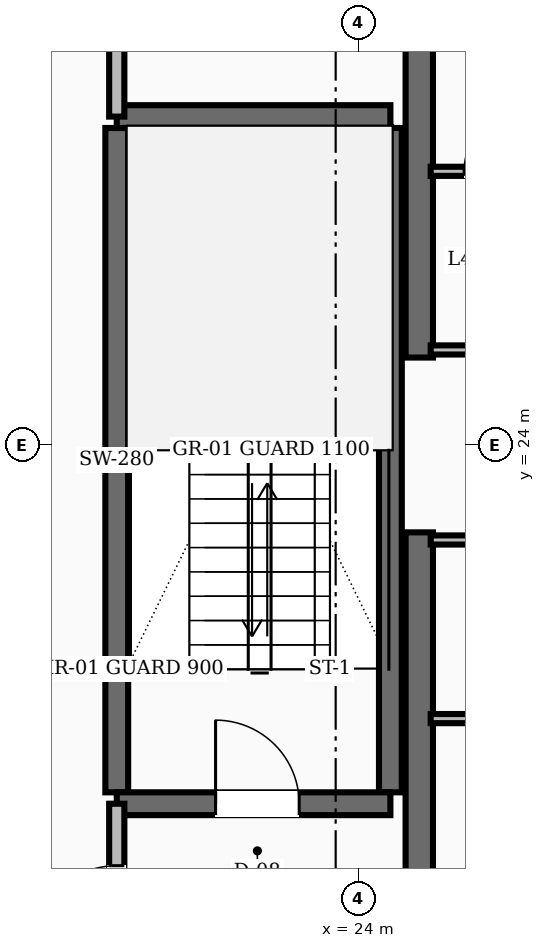
"""IFC4 building model, lengths in metres.
Left out: names, types, materials, properties, quantities, classifications, styles, units other than length and angle.
Written with IfcOpenShell. Run it as: python <this file> out.ifc"""

import sys

from ifc_helpers import new_model, si_unit, direction, frame, frame_2d, origin, place, context, subcontext, project, spatial, rectangle, extrude, element, fill, save


model = new_model("IFC4")
c1 = context("Model", 3, precision=1e-05, world=origin(), true_north=direction((0.0, 1.0)))
c2 = subcontext(c1, "Body", "Model", "MODEL_VIEW")
j1 = project(units=[si_unit("LENGTHUNIT", "METRE"), si_unit("PLANEANGLEUNIT", "RADIAN")], contexts=[c1])
p1 = place(None, origin())
s1 = spatial("IfcSite", under=j1, at=p1, CompositionType="ELEMENT")
p2 = place(p1, origin())
s2 = spatial("IfcBuilding", under=s1, at=p2, CompositionType="ELEMENT")
p3 = place(p2, frame((0.0, 0.0, 156.8)))
s3 = spatial("IfcBuildingStorey", under=s2, at=p3, CompositionType="ELEMENT", Elevation=156.8)
for number, where, z_axis, x_axis in (
    (1, (24.8, 16.55, 0.0), (0.0, 0.0, 1.0), (0.0, 1.0, 0.0)),
    (2, (24.8, 25.15, 0.0), (0.0, 0.0, 1.0), (0.0, 1.0, 0.0)),
):
    element("IfcWall", number, at=place(p3, frame(where, z_axis=z_axis, x_axis=x_axis)), inside=s3, PredefinedType="SHEAR", context=c2, shape_type="SweptSolid", body=[
        extrude(rectangle(XDim=6.3, YDim=0.36, at=frame_2d((3.15, 0.0))), origin(), (0.0, 0.0, 1.0), 3.6),
    ])
for number, where, z_axis, x_axis in (
    (3, (20.82, 19.43, 0.0), (0.0, 0.0, 1.0), (0.0, 1.0, 0.0)),
    (4, (24.42, 19.43, 0.0), (0.0, 0.0, 1.0), (0.0, 1.0, 0.0)),
):
    element("IfcWall", number, at=place(p3, frame(where, z_axis=z_axis, x_axis=x_axis)), inside=s3, PredefinedType="SHEAR", context=c2, shape_type="SweptSolid", body=[
        extrude(rectangle(XDim=8.74, YDim=0.3, at=frame_2d((4.37, 0.0))), origin(), (0.0, 0.0, 1.0), 3.6),
    ])
p4 = place(p3, frame((20.82, 19.28, 0.0), z_axis=(0.0, 0.0, 1.0), x_axis=(1.0, 0.0, 0.0)))
e5 = element("IfcWall", 5, at=p4, inside=s3, PredefinedType="SHEAR", context=c2, shape_type="SweptSolid", body=[
    extrude(rectangle(XDim=3.6, YDim=0.3, at=frame_2d((1.8, 0.0))), origin(), (0.0, 0.0, 1.0), 3.6),
])
p5 = place(p4, frame((1.3, 0.0, 0.0)))
e6 = element("IfcOpeningElement", 6, at=p5, cuts=e5, PredefinedType="OPENING", context=c2, shape_type="SweptSolid", body=[
    extrude(rectangle(XDim=1.1, YDim=2.1, at=frame_2d((0.55, 1.05))), frame((0.0, 0.16, 0.0), z_axis=(0.0, -1.0, 0.0), x_axis=(1.0, 0.0, 0.0)), (0.0, 0.0, 1.0), 0.32),
])
p6 = place(p3, frame((20.82, 28.32, 0.0), z_axis=(0.0, 0.0, 1.0), x_axis=(1.0, 0.0, 0.0)))
e7 = element("IfcWall", 7, at=p6, inside=s3, PredefinedType="SHEAR", context=c2, shape_type="SweptSolid", body=[
    extrude(rectangle(XDim=3.6, YDim=0.3, at=frame_2d((1.8, 0.0))), origin(), (0.0, 0.0, 1.0), 3.6),
])
p7 = place(p3, frame((20.82, 16.55, 0.0), z_axis=(0.0, 0.0, 1.0), x_axis=(0.0, 1.0, 0.0)))
e8 = element("IfcWall", 8, at=p7, inside=s3, PredefinedType="SOLIDWALL", context=c2, shape_type="SweptSolid", body=[
    extrude(rectangle(XDim=2.73, YDim=0.2, at=frame_2d((1.365, 0.0))), origin(), (0.0, 0.0, 1.0), 2.8),
])
p8 = place(p7, frame((0.815, 0.0, 0.0)))
e9 = element("IfcOpeningElement", 9, at=p8, cuts=e8, PredefinedType="OPENING", context=c2, shape_type="SweptSolid", body=[
    extrude(rectangle(XDim=1.1, YDim=2.1, at=frame_2d((0.55, 1.05))), frame((0.0, 0.11, 0.0), z_axis=(0.0, -1.0, 0.0), x_axis=(1.0, 0.0, 0.0)), (0.0, 0.0, 1.0), 0.22),
])
p9 = place(p3, frame((20.82, 28.32, 0.0), z_axis=(0.0, 0.0, 1.0), x_axis=(0.0, 1.0, 0.0)))
e10 = element("IfcWall", 10, at=p9, inside=s3, PredefinedType="SOLIDWALL", context=c2, shape_type="SweptSolid", body=[
    extrude(rectangle(XDim=3.13, YDim=0.2, at=frame_2d((1.565, 0.0))), origin(), (0.0, 0.0, 1.0), 2.8),
])
p10 = place(p9, frame((1.09, 0.0, 0.0)))
e11 = element("IfcOpeningElement", 11, at=p10, cuts=e10, PredefinedType="OPENING", context=c2, shape_type="SweptSolid", body=[
    extrude(rectangle(XDim=0.95, YDim=2.1, at=frame_2d((0.475, 1.05))), frame((0.0, 0.11, 0.0), z_axis=(0.0, -1.0, 0.0), x_axis=(1.0, 0.0, 0.0)), (0.0, 0.0, 1.0), 0.22),
])
p11 = place(p3, frame((24.95, 25.25, 0.0), z_axis=(0.0, 0.0, 1.0), x_axis=(1.0, 0.0, 0.0)))
e12 = element("IfcWall", 12, at=p11, inside=s3, PredefinedType="PARTITIONING", context=c2, shape_type="SweptSolid", body=[
    extrude(rectangle(XDim=3.2, YDim=0.12, at=frame_2d((1.6, 0.0))), origin(), (0.0, 0.0, 1.0), 2.8),
])
p12 = place(p11, frame((1.125, 0.0, 0.0)))
e13 = element("IfcOpeningElement", 13, at=p12, cuts=e12, PredefinedType="OPENING", context=c2, shape_type="SweptSolid", body=[
    extrude(rectangle(XDim=0.95, YDim=2.1, at=frame_2d((0.475, 1.05))), frame((0.0, 0.07, 0.0), z_axis=(0.0, -1.0, 0.0), x_axis=(1.0, 0.0, 0.0)), (0.0, 0.0, 1.0), 0.14),
])
p13 = place(p3, frame((24.95, 22.75, 0.0), z_axis=(0.0, 0.0, 1.0), x_axis=(1.0, 0.0, 0.0)))
e14 = element("IfcWall", 14, at=p13, inside=s3, PredefinedType="PARTITIONING", context=c2, shape_type="SweptSolid", body=[
    extrude(rectangle(XDim=3.2, YDim=0.12, at=frame_2d((1.6, 0.0))), origin(), (0.0, 0.0, 1.0), 2.8),
])
p14 = place(p13, frame((1.125, 0.0, 0.0)))
e15 = element("IfcOpeningElement", 15, at=p14, cuts=e14, PredefinedType="OPENING", context=c2, shape_type="SweptSolid", body=[
    extrude(rectangle(XDim=0.95, YDim=2.1, at=frame_2d((0.475, 1.05))), frame((0.0, 0.07, 0.0), z_axis=(0.0, -1.0, 0.0), x_axis=(1.0, 0.0, 0.0)), (0.0, 0.0, 1.0), 0.14),
])
p15 = place(p3, frame((24.95, 27.6, 0.0), z_axis=(0.0, 0.0, 1.0), x_axis=(1.0, 0.0, 0.0)))
e16 = element("IfcWall", 16, at=p15, inside=s3, PredefinedType="PARTITIONING", context=c2, shape_type="SweptSolid", body=[
    extrude(rectangle(XDim=3.2, YDim=0.12, at=frame_2d((1.6, 0.0))), origin(), (0.0, 0.0, 1.0), 2.8),
])
p16 = place(p15, frame((0.44, 0.0, 0.0)))
e17 = element("IfcOpeningElement", 17, at=p16, cuts=e16, PredefinedType="OPENING", context=c2, shape_type="SweptSolid", body=[
    extrude(rectangle(XDim=0.86, YDim=2.1, at=frame_2d((0.43, 1.05))), frame((0.0, 0.07, 0.0), z_axis=(0.0, -1.0, 0.0), x_axis=(1.0, 0.0, 0.0)), (0.0, 0.0, 1.0), 0.14),
])
p17 = place(p15, frame((1.9, 0.0, 0.0)))
e18 = element("IfcOpeningElement", 18, at=p17, cuts=e16, PredefinedType="OPENING", context=c2, shape_type="SweptSolid", body=[
    extrude(rectangle(XDim=0.86, YDim=2.1, at=frame_2d((0.43, 1.05))), frame((0.0, 0.07, 0.0), z_axis=(0.0, -1.0, 0.0), x_axis=(1.0, 0.0, 0.0)), (0.0, 0.0, 1.0), 0.14),
])
p18 = place(p3, frame((24.95, 20.4, 0.0), z_axis=(0.0, 0.0, 1.0), x_axis=(1.0, 0.0, 0.0)))
e19 = element("IfcWall", 19, at=p18, inside=s3, PredefinedType="PARTITIONING", context=c2, shape_type="SweptSolid", body=[
    extrude(rectangle(XDim=3.2, YDim=0.12, at=frame_2d((1.6, 0.0))), origin(), (0.0, 0.0, 1.0), 2.8),
])
p19 = place(p18, frame((1.125, 0.0, 0.0)))
e20 = element("IfcOpeningElement", 20, at=p19, cuts=e19, PredefinedType="OPENING", context=c2, shape_type="SweptSolid", body=[
    extrude(rectangle(XDim=0.95, YDim=2.1, at=frame_2d((0.475, 1.05))), frame((0.0, 0.07, 0.0), z_axis=(0.0, -1.0, 0.0), x_axis=(1.0, 0.0, 0.0)), (0.0, 0.0, 1.0), 0.14),
])
p20 = place(p5, origin())
e21 = element("IfcDoor", 21, at=p20, inside=s3, OperationType="SINGLE_SWING_LEFT", PredefinedType="DOOR", context=c2, shape_type="SweptSolid", body=[
    extrude(rectangle(XDim=1.1, YDim=2.1, at=frame_2d((0.55, 1.05))), frame((0.0, 0.025, 0.0), z_axis=(0.0, -1.0, 0.0), x_axis=(1.0, 0.0, 0.0)), (0.0, 0.0, 1.0), 0.05),
])
fill(e6, e21)
p21 = place(p8, origin())
e22 = element("IfcDoor", 22, at=p21, inside=s3, OperationType="SINGLE_SWING_LEFT", PredefinedType="DOOR", context=c2, shape_type="SweptSolid", body=[
    extrude(rectangle(XDim=1.1, YDim=2.1, at=frame_2d((0.55, 1.05))), frame((0.0, 0.025, 0.0), z_axis=(0.0, -1.0, 0.0), x_axis=(1.0, 0.0, 0.0)), (0.0, 0.0, 1.0), 0.05),
])
fill(e9, e22)
p22 = place(p16, origin())
e23 = element("IfcDoor", 23, at=p22, inside=s3, OperationType="SINGLE_SWING_RIGHT", PredefinedType="DOOR", context=c2, shape_type="SweptSolid", body=[
    extrude(rectangle(XDim=0.86, YDim=2.1, at=frame_2d((0.43, 1.05))), frame((0.0, 0.025, 0.0), z_axis=(0.0, -1.0, 0.0), x_axis=(1.0, 0.0, 0.0)), (0.0, 0.0, 1.0), 0.05),
])
fill(e17, e23)
save(model, sys.argv[1])
